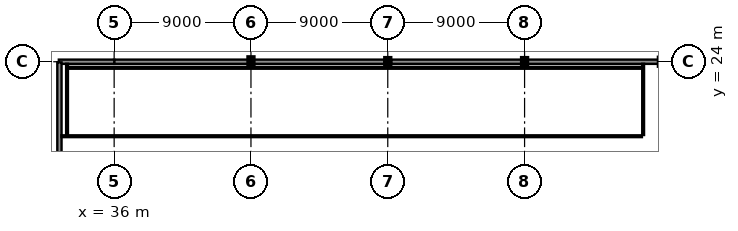
"""IFC4 building model, lengths in metres.
Left out: names, types, materials, properties, quantities, classifications, styles, units other than length and angle.
Written with IfcOpenShell. Run it as: python <this file> out.ifc"""

import sys

from ifc_helpers import new_model, si_unit, direction, frame, frame_2d, origin, origin_2d, place, context, subcontext, project, spatial, rectangle, i_section, extrude, element, fill, save


model = new_model("IFC4")
c1 = context("Model", 3, precision=1e-05, world=origin(), true_north=direction((0.0, 1.0)))
c2 = subcontext(c1, "Body", "Model", "MODEL_VIEW")
j1 = project(units=[si_unit("LENGTHUNIT", "METRE"), si_unit("PLANEANGLEUNIT", "RADIAN")], contexts=[c1])
p1 = place(None, origin())
s1 = spatial("IfcSite", under=j1, at=p1, CompositionType="ELEMENT")
p2 = place(p1, origin())
s2 = spatial("IfcBuilding", under=s1, at=p2, CompositionType="ELEMENT")
p3 = place(p2, frame((0.0, 0.0, 31.4)))
s3 = spatial("IfcBuildingStorey", under=s2, at=p3, CompositionType="ELEMENT", Elevation=31.4)
p4 = place(p3, frame((45.0, 24.0, 0.0), z_axis=(0.0, 0.0, 1.0), x_axis=(1.0, 0.0, 0.0)))
e1 = element("IfcColumn", 1, at=p4, inside=s3, PredefinedType="COLUMN", context=c2, shape_type="SweptSolid", body=[
    extrude(i_section(OverallWidth=0.3, OverallDepth=0.55, WebThickness=0.015, FlangeThickness=0.029, at=origin_2d()), origin(), (0.0, 0.0, 1.0), 4.0),
])
for number, where, z_axis, x_axis in (
    (2, (54.0, 24.0, 0.0), (0.0, 0.0, 1.0), (0.0, 1.0, 0.0)),
    (3, (63.0, 24.0, 0.0), (0.0, 0.0, 1.0), (1.0, 0.0, 0.0)),
):
    element("IfcColumn", number, at=place(p3, frame(where, z_axis=z_axis, x_axis=x_axis)), inside=s3, PredefinedType="COLUMN", context=c2, shape_type="SweptSolid", body=[
        extrude(i_section(OverallWidth=0.3, OverallDepth=0.45, WebThickness=0.014, FlangeThickness=0.026, at=origin_2d()), origin(), (0.0, 0.0, 1.0), 4.0),
    ])
p5 = place(p3, frame((71.992, 24.0, 0.0), z_axis=(0.0, 0.0, 1.0), x_axis=(-1.0, 0.0, 0.0)))
e4 = element("IfcWall", 4, at=p5, inside=s3, PredefinedType="SOLIDWALL", context=c2, shape_type="SweptSolid", body=[
    extrude(rectangle(XDim=8.984, YDim=0.28, at=frame_2d((4.492, 0.0))), origin(), (0.0, 0.0, 1.0), 2.787),
])
p6 = place(p5, frame((2.045, 0.0, 1.05)))
e5 = element("IfcOpeningElement", 5, at=p6, cuts=e4, PredefinedType="OPENING", context=c2, shape_type="SweptSolid", body=[
    extrude(rectangle(XDim=1.3, YDim=1.3, at=frame_2d((0.65, 0.65))), frame((0.0, 0.155, 0.0), z_axis=(0.0, -1.0, 0.0), x_axis=(1.0, 0.0, 0.0)), (0.0, 0.0, 1.0), 0.31),
])
p7 = place(p5, frame((5.639, 0.0, 1.05)))
e6 = element("IfcOpeningElement", 6, at=p7, cuts=e4, PredefinedType="OPENING", context=c2, shape_type="SweptSolid", body=[
    extrude(rectangle(XDim=1.3, YDim=1.3, at=frame_2d((0.65, 0.65))), frame((0.0, 0.155, 0.0), z_axis=(0.0, -1.0, 0.0), x_axis=(1.0, 0.0, 0.0)), (0.0, 0.0, 1.0), 0.31),
])
p8 = place(p3, frame((62.992, 24.0, 0.0), z_axis=(0.0, 0.0, 1.0), x_axis=(-1.0, 0.0, 0.0)))
e7 = element("IfcWall", 7, at=p8, inside=s3, PredefinedType="SOLIDWALL", context=c2, shape_type="SweptSolid", body=[
    extrude(rectangle(XDim=8.769, YDim=0.28, at=frame_2d((4.385, 0.0))), origin(), (0.0, 0.0, 1.0), 2.787),
])
p9 = place(p8, frame((1.981, 0.0, 1.05)))
e8 = element("IfcOpeningElement", 8, at=p9, cuts=e7, PredefinedType="OPENING", context=c2, shape_type="SweptSolid", body=[
    extrude(rectangle(XDim=1.3, YDim=1.3, at=frame_2d((0.65, 0.65))), frame((0.0, 0.155, 0.0), z_axis=(0.0, -1.0, 0.0), x_axis=(1.0, 0.0, 0.0)), (0.0, 0.0, 1.0), 0.31),
])
p10 = place(p8, frame((5.488, 0.0, 1.05)))
e9 = element("IfcOpeningElement", 9, at=p10, cuts=e7, PredefinedType="OPENING", context=c2, shape_type="SweptSolid", body=[
    extrude(rectangle(XDim=1.3, YDim=1.3, at=frame_2d((0.65, 0.65))), frame((0.0, 0.155, 0.0), z_axis=(0.0, -1.0, 0.0), x_axis=(1.0, 0.0, 0.0)), (0.0, 0.0, 1.0), 0.31),
])
p11 = place(p3, frame((53.777, 24.0, 0.0), z_axis=(0.0, 0.0, 1.0), x_axis=(-1.0, 0.0, 0.0)))
e10 = element("IfcWall", 10, at=p11, inside=s3, PredefinedType="SOLIDWALL", context=c2, shape_type="SweptSolid", body=[
    extrude(rectangle(XDim=8.769, YDim=0.28, at=frame_2d((4.385, 0.0))), origin(), (0.0, 0.0, 1.0), 2.787),
])
p12 = place(p11, frame((1.981, 0.0, 1.05)))
e11 = element("IfcOpeningElement", 11, at=p12, cuts=e10, PredefinedType="OPENING", context=c2, shape_type="SweptSolid", body=[
    extrude(rectangle(XDim=1.3, YDim=1.3, at=frame_2d((0.65, 0.65))), frame((0.0, 0.155, 0.0), z_axis=(0.0, -1.0, 0.0), x_axis=(1.0, 0.0, 0.0)), (0.0, 0.0, 1.0), 0.31),
])
p13 = place(p11, frame((5.488, 0.0, 1.05)))
e12 = element("IfcOpeningElement", 12, at=p13, cuts=e10, PredefinedType="OPENING", context=c2, shape_type="SweptSolid", body=[
    extrude(rectangle(XDim=1.3, YDim=1.3, at=frame_2d((0.65, 0.65))), frame((0.0, 0.155, 0.0), z_axis=(0.0, -1.0, 0.0), x_axis=(1.0, 0.0, 0.0)), (0.0, 0.0, 1.0), 0.31),
])
p14 = place(p3, frame((44.992, 24.0, 0.0), z_axis=(0.0, 0.0, 1.0), x_axis=(-1.0, 0.0, 0.0)))
e13 = element("IfcWall", 13, at=p14, inside=s3, PredefinedType="SOLIDWALL", context=c2, shape_type="SweptSolid", body=[
    extrude(rectangle(XDim=9.002, YDim=0.28, at=frame_2d((4.501, 0.0))), origin(), (0.0, 0.0, 1.0), 2.787),
])
p15 = place(p3, frame((36.01, 24.0, 0.0), z_axis=(0.0, 0.0, 1.0), x_axis=(-1.0, 0.0, 0.0)))
e14 = element("IfcWall", 14, at=p15, inside=s3, PredefinedType="SOLIDWALL", context=c2, shape_type="SweptSolid", body=[
    extrude(rectangle(XDim=3.65, YDim=0.28, at=frame_2d((1.825, 0.0))), origin(), (0.0, 0.0, 1.0), 2.787),
])
p16 = place(p3, frame((32.4, 23.96, 0.0), z_axis=(0.0, 0.0, 1.0), x_axis=(0.0, -1.0, 0.0)))
e15 = element("IfcWall", 15, at=p16, inside=s3, PredefinedType="SOLIDWALL", context=c2, shape_type="SweptSolid", body=[
    extrude(rectangle(XDim=11.97, YDim=0.28, at=frame_2d((5.985, 0.0))), origin(), (0.0, 0.0, 1.0), 3.095),
])
p17 = place(p16, frame((2.941, 0.0, 1.05)))
e16 = element("IfcOpeningElement", 16, at=p17, cuts=e15, PredefinedType="OPENING", context=c2, shape_type="SweptSolid", body=[
    extrude(rectangle(XDim=1.3, YDim=1.3, at=frame_2d((0.65, 0.65))), frame((0.0, 0.155, 0.0), z_axis=(0.0, -1.0, 0.0), x_axis=(1.0, 0.0, 0.0)), (0.0, 0.0, 1.0), 0.31),
])
p18 = place(p16, frame((8.5, 0.0, 1.05)))
e17 = element("IfcOpeningElement", 17, at=p18, cuts=e15, PredefinedType="OPENING", context=c2, shape_type="SweptSolid", body=[
    extrude(rectangle(XDim=1.3, YDim=1.3, at=frame_2d((0.65, 0.65))), frame((0.0, 0.155, 0.0), z_axis=(0.0, -1.0, 0.0), x_axis=(1.0, 0.0, 0.0)), (0.0, 0.0, 1.0), 0.31),
])
p19 = place(p3, frame((70.8, 23.865, 0.0), z_axis=(0.0, 0.0, 1.0), x_axis=(0.0, -1.0, 0.0)))
e18 = element("IfcWall", 18, at=p19, inside=s3, PredefinedType="PARTITIONING", context=c2, shape_type="SweptSolid", body=[
    extrude(rectangle(XDim=4.685, YDim=0.12, at=frame_2d((2.343, 0.0))), origin(), (0.0, 0.0, 1.0), 3.64),
])
p20 = place(p3, frame((70.72, 19.1, 0.0), z_axis=(0.0, 0.0, 1.0), x_axis=(-1.0, 0.0, 0.0)))
e19 = element("IfcWall", 19, at=p20, inside=s3, PredefinedType="PARTITIONING", context=c2, shape_type="SweptSolid", body=[
    extrude(rectangle(XDim=38.185, YDim=0.12, at=frame_2d((19.093, 0.0))), origin(), (0.0, 0.0, 1.0), 3.64),
])
p21 = place(p20, frame((18.617, 0.0, 0.0)))
e20 = element("IfcOpeningElement", 20, at=p21, cuts=e19, PredefinedType="OPENING", context=c2, shape_type="SweptSolid", body=[
    extrude(rectangle(XDim=0.95, YDim=2.15, at=frame_2d((0.475, 1.075))), frame((0.0, 0.075, 0.0), z_axis=(0.0, -1.0, 0.0), x_axis=(1.0, 0.0, 0.0)), (0.0, 0.0, 1.0), 0.15),
])
p22 = place(p3, frame((32.9, 19.155, 0.0), z_axis=(0.0, 0.0, 1.0), x_axis=(0.0, 1.0, 0.0)))
e21 = element("IfcWall", 21, at=p22, inside=s3, PredefinedType="PARTITIONING", context=c2, shape_type="SweptSolid", body=[
    extrude(rectangle(XDim=4.71, YDim=0.12, at=frame_2d((2.355, 0.0))), origin(), (0.0, 0.0, 1.0), 3.64),
])
p23 = place(p3, frame((32.955, 23.6, 0.0), z_axis=(0.0, 0.0, 1.0), x_axis=(1.0, 0.0, 0.0)))
e22 = element("IfcWall", 22, at=p23, inside=s3, PredefinedType="PARTITIONING", context=c2, shape_type="SweptSolid", body=[
    extrude(rectangle(XDim=37.79, YDim=0.12, at=frame_2d((18.895, 0.0))), origin(), (0.0, 0.0, 1.0), 3.64),
])
p24 = place(p6, origin())
e23 = element("IfcWindow", 23, at=p24, inside=s3, PartitioningType="SINGLE_PANEL", PredefinedType="WINDOW", context=c2, shape_type="SweptSolid", body=[
    extrude(rectangle(XDim=1.3, YDim=1.3, at=frame_2d((0.65, 0.65))), frame((0.0, 0.03, 0.0), z_axis=(0.0, -1.0, 0.0), x_axis=(1.0, 0.0, 0.0)), (0.0, 0.0, 1.0), 0.06),
])
fill(e5, e23)
p25 = place(p7, origin())
e24 = element("IfcWindow", 24, at=p25, inside=s3, PartitioningType="SINGLE_PANEL", PredefinedType="WINDOW", context=c2, shape_type="SweptSolid", body=[
    extrude(rectangle(XDim=1.3, YDim=1.3, at=frame_2d((0.65, 0.65))), frame((0.0, 0.03, 0.0), z_axis=(0.0, -1.0, 0.0), x_axis=(1.0, 0.0, 0.0)), (0.0, 0.0, 1.0), 0.06),
])
fill(e6, e24)
p26 = place(p9, origin())
e25 = element("IfcWindow", 25, at=p26, inside=s3, PartitioningType="SINGLE_PANEL", PredefinedType="WINDOW", context=c2, shape_type="SweptSolid", body=[
    extrude(rectangle(XDim=1.3, YDim=1.3, at=frame_2d((0.65, 0.65))), frame((0.0, 0.03, 0.0), z_axis=(0.0, -1.0, 0.0), x_axis=(1.0, 0.0, 0.0)), (0.0, 0.0, 1.0), 0.06),
])
fill(e8, e25)
p27 = place(p10, origin())
e26 = element("IfcWindow", 26, at=p27, inside=s3, PartitioningType="SINGLE_PANEL", PredefinedType="WINDOW", context=c2, shape_type="SweptSolid", body=[
    extrude(rectangle(XDim=1.3, YDim=1.3, at=frame_2d((0.65, 0.65))), frame((0.0, 0.03, 0.0), z_axis=(0.0, -1.0, 0.0), x_axis=(1.0, 0.0, 0.0)), (0.0, 0.0, 1.0), 0.06),
])
fill(e9, e26)
p28 = place(p12, origin())
e27 = element("IfcWindow", 27, at=p28, inside=s3, PartitioningType="SINGLE_PANEL", PredefinedType="WINDOW", context=c2, shape_type="SweptSolid", body=[
    extrude(rectangle(XDim=1.3, YDim=1.3, at=frame_2d((0.65, 0.65))), frame((0.0, 0.03, 0.0), z_axis=(0.0, -1.0, 0.0), x_axis=(1.0, 0.0, 0.0)), (0.0, 0.0, 1.0), 0.06),
])
fill(e11, e27)
p29 = place(p13, origin())
e28 = element("IfcWindow", 28, at=p29, inside=s3, PartitioningType="SINGLE_PANEL", PredefinedType="WINDOW", context=c2, shape_type="SweptSolid", body=[
    extrude(rectangle(XDim=1.3, YDim=1.3, at=frame_2d((0.65, 0.65))), frame((0.0, 0.03, 0.0), z_axis=(0.0, -1.0, 0.0), x_axis=(1.0, 0.0, 0.0)), (0.0, 0.0, 1.0), 0.06),
])
fill(e12, e28)
p30 = place(p17, origin())
e29 = element("IfcWindow", 29, at=p30, inside=s3, PartitioningType="SINGLE_PANEL", PredefinedType="WINDOW", context=c2, shape_type="SweptSolid", body=[
    extrude(rectangle(XDim=1.3, YDim=1.3, at=frame_2d((0.65, 0.65))), frame((0.0, 0.03, 0.0), z_axis=(0.0, -1.0, 0.0), x_axis=(1.0, 0.0, 0.0)), (0.0, 0.0, 1.0), 0.06),
])
fill(e16, e29)
p31 = place(p21, frame((0.95, 0.0, 0.0), z_axis=(0.0, 0.0, 1.0), x_axis=(-1.0, 0.0, 0.0)))
e30 = element("IfcDoor", 30, at=p31, inside=s3, OperationType="SINGLE_SWING_RIGHT", PredefinedType="DOOR", context=c2, shape_type="SweptSolid", body=[
    extrude(rectangle(XDim=0.95, YDim=2.15, at=frame_2d((0.475, 1.075))), frame((0.0, 0.025, 0.0), z_axis=(0.0, -1.0, 0.0), x_axis=(1.0, 0.0, 0.0)), (0.0, 0.0, 1.0), 0.05),
])
fill(e20, e30)
save(model, sys.argv[1])
